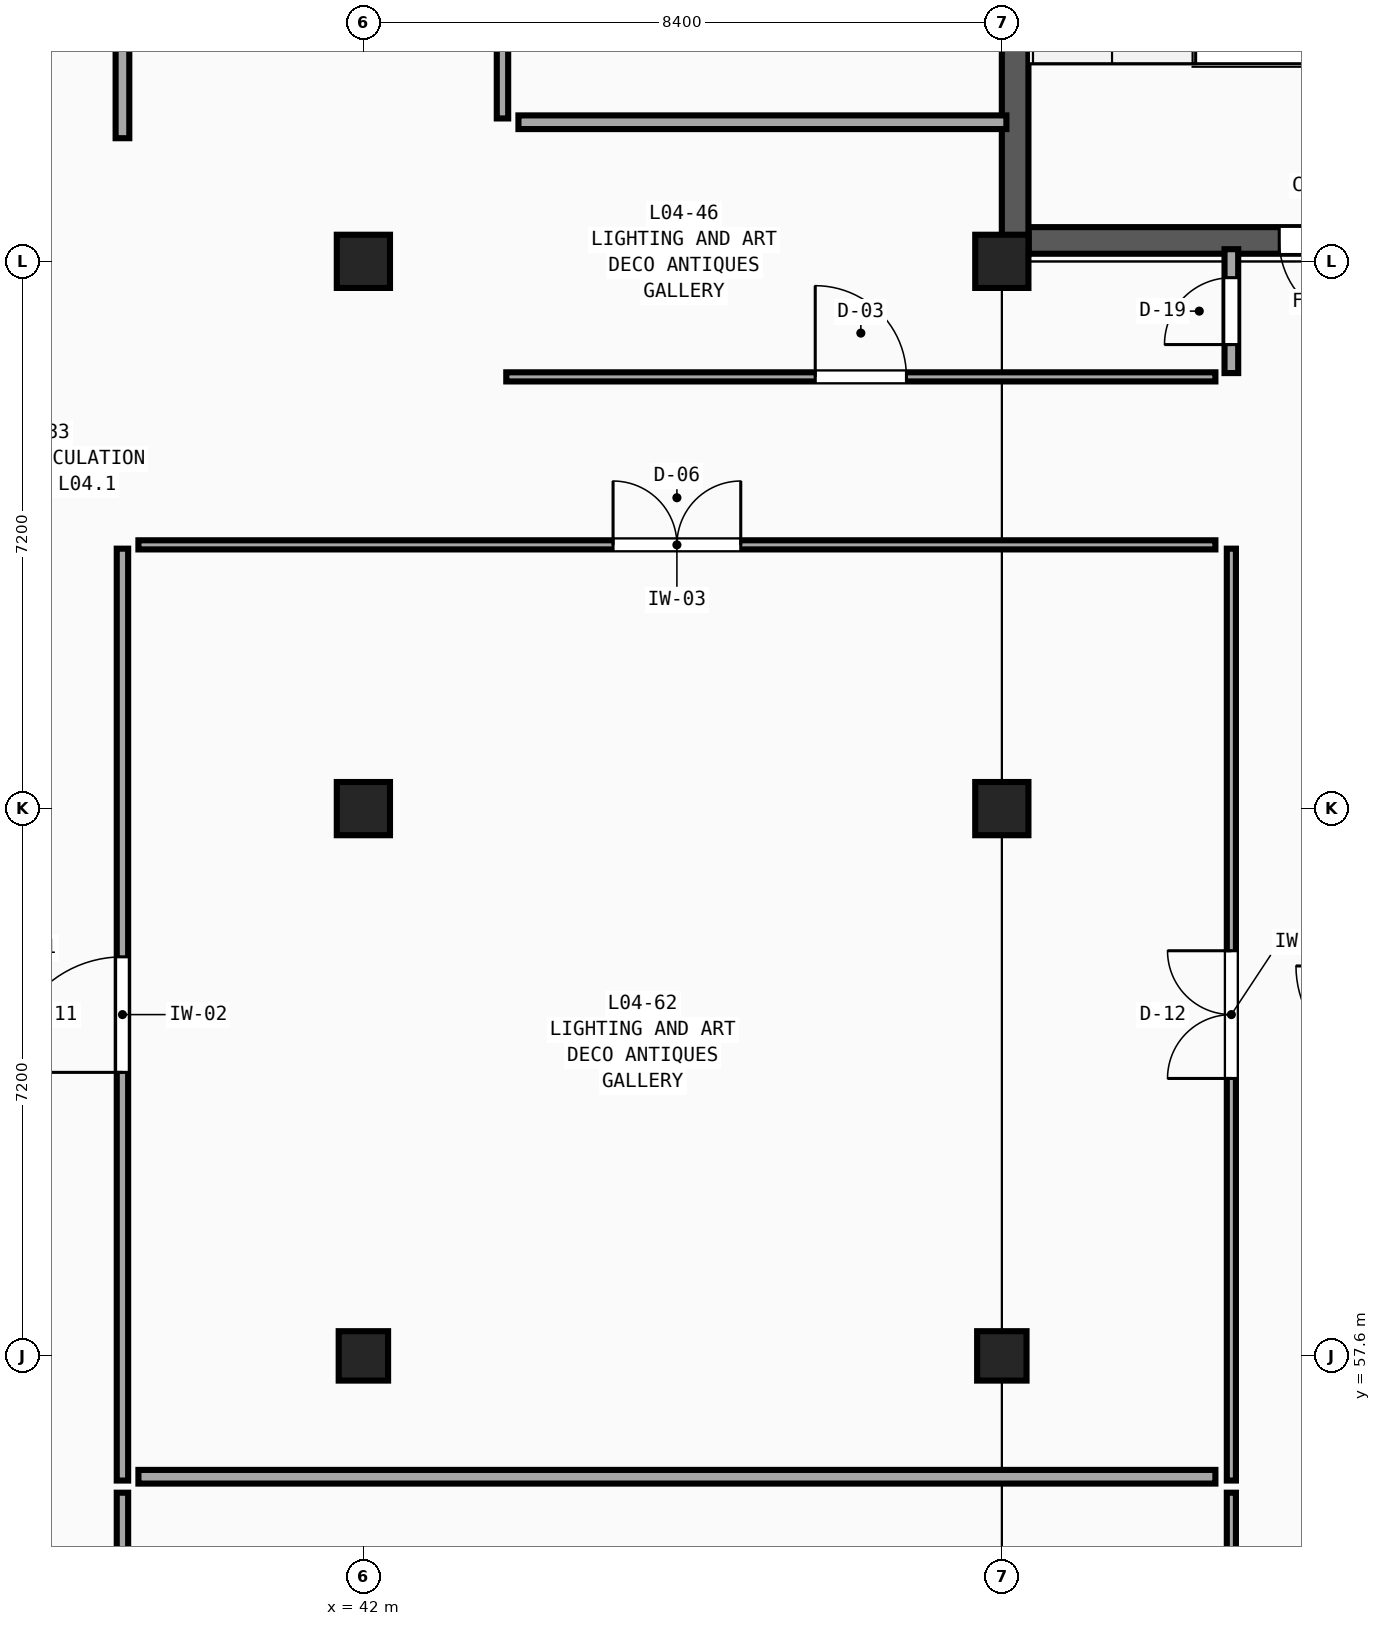
"""IFC4 building model, lengths in metres.
Left out: names, types, materials, properties, quantities, classifications, styles, units other than length and angle.
Written with IfcOpenShell. Run it as: python <this file> out.ifc"""

import sys

from ifc_helpers import new_model, si_unit, direction, frame, frame_2d, origin, origin_2d, place, context, subcontext, project, spatial, rectangle, extrude, element, fill, save


model = new_model("IFC4")
c1 = context("Model", 3, precision=1e-05, world=origin(), true_north=direction((0.0, 1.0)))
c2 = subcontext(c1, "Body", "Model", "MODEL_VIEW")
j1 = project(units=[si_unit("LENGTHUNIT", "METRE"), si_unit("PLANEANGLEUNIT", "RADIAN")], contexts=[c1])
p1 = place(None, origin())
s1 = spatial("IfcSite", under=j1, at=p1, CompositionType="ELEMENT")
p2 = place(p1, origin())
s2 = spatial("IfcBuilding", under=s1, at=p2, CompositionType="ELEMENT")
p3 = place(p2, frame((0.0, 0.0, 18.9)))
s3 = spatial("IfcBuildingStorey", under=s2, at=p3, CompositionType="ELEMENT", Elevation=18.9)
p4 = place(p3, frame((42.0, 57.6, 0.0), z_axis=(0.0, 0.0, 1.0), x_axis=(1.0, 0.0, 0.0)))
e1 = element("IfcColumn", 1, at=p4, inside=s3, PredefinedType="COLUMN", context=c2, shape_type="SweptSolid", body=[
    extrude(rectangle(XDim=0.65, YDim=0.65, at=origin_2d()), origin(), (0.0, 0.0, 1.0), 4.5),
])
for number, where, z_axis, x_axis in (
    (2, (42.0, 64.8, 0.0), (0.0, 0.0, 1.0), (1.0, 0.0, 0.0)),
    (3, (42.0, 72.0, 0.0), (0.0, 0.0, 1.0), (1.0, 0.0, 0.0)),
):
    element("IfcColumn", number, at=place(p3, frame(where, z_axis=z_axis, x_axis=x_axis)), inside=s3, PredefinedType="COLUMN", context=c2, shape_type="SweptSolid", body=[
        extrude(rectangle(XDim=0.7, YDim=0.7, at=origin_2d()), origin(), (0.0, 0.0, 1.0), 4.5),
    ])
p5 = place(p3, frame((50.4, 57.6, 0.0), z_axis=(0.0, 0.0, 1.0), x_axis=(1.0, 0.0, 0.0)))
e4 = element("IfcColumn", 4, at=p5, inside=s3, PredefinedType="COLUMN", context=c2, shape_type="SweptSolid", body=[
    extrude(rectangle(XDim=0.65, YDim=0.65, at=origin_2d()), origin(), (0.0, 0.0, 1.0), 4.5),
])
for number, where, z_axis, x_axis in (
    (5, (50.4, 64.8, 0.0), (0.0, 0.0, 1.0), (1.0, 0.0, 0.0)),
    (6, (50.4, 72.0, 0.0), (0.0, 0.0, 1.0), (1.0, 0.0, 0.0)),
):
    element("IfcColumn", number, at=place(p3, frame(where, z_axis=z_axis, x_axis=x_axis)), inside=s3, PredefinedType="COLUMN", context=c2, shape_type="SweptSolid", body=[
        extrude(rectangle(XDim=0.7, YDim=0.7, at=origin_2d()), origin(), (0.0, 0.0, 1.0), 4.5),
    ])
p6 = place(p3, frame((58.45, 72.275, 0.0), z_axis=(0.0, 0.0, 1.0), x_axis=(-1.0, 0.0, 0.0)))
e7 = element("IfcWall", 7, at=p6, inside=s3, PredefinedType="SHEAR", context=c2, shape_type="SweptSolid", body=[
    extrude(rectangle(XDim=7.7, YDim=0.35, at=frame_2d((3.85, 0.0))), origin(), (0.0, 0.0, 1.0), 4.5),
])
p7 = place(p6, frame((3.3, 0.0, 0.0)))
e8 = element("IfcOpeningElement", 8, at=p7, cuts=e7, PredefinedType="OPENING", context=c2, shape_type="SweptSolid", body=[
    extrude(rectangle(XDim=1.1, YDim=2.2, at=frame_2d((0.55, 1.1))), frame((0.0, 0.195, 0.0), z_axis=(0.0, -1.0, 0.0), x_axis=(1.0, 0.0, 0.0)), (0.0, 0.0, 1.0), 0.39),
])
p8 = place(p3, frame((50.575, 80.45, 0.0), z_axis=(0.0, 0.0, 1.0), x_axis=(0.0, -1.0, 0.0)))
e9 = element("IfcWall", 9, at=p8, inside=s3, PredefinedType="SHEAR", context=c2, shape_type="SweptSolid", body=[
    extrude(rectangle(XDim=8.35, YDim=0.35, at=frame_2d((4.175, 0.0))), origin(), (0.0, 0.0, 1.0), 4.5),
])
p9 = place(p3, frame((53.42, 39.91, 0.0), z_axis=(0.0, 0.0, 1.0), x_axis=(0.0, 1.0, 0.0)))
e10 = element("IfcWall", 10, at=p9, inside=s3, PredefinedType="PARTITIONING", context=c2, shape_type="SweptSolid", body=[
    extrude(rectangle(XDim=15.89, YDim=0.12, at=frame_2d((7.945, 0.0))), origin(), (0.0, 0.0, 1.0), 4.18),
])
p10 = place(p9, frame((7.105, 0.0, 0.0)))
e11 = element("IfcOpeningElement", 11, at=p10, cuts=e10, PredefinedType="OPENING", context=c2, shape_type="SweptSolid", body=[
    extrude(rectangle(XDim=1.68, YDim=2.45, at=frame_2d((0.84, 1.225))), frame((0.0, 0.08, 0.0), z_axis=(0.0, -1.0, 0.0), x_axis=(1.0, 0.0, 0.0)), (0.0, 0.0, 1.0), 0.16),
])
p11 = place(p3, frame((39.04, 68.27, 0.0), z_axis=(0.0, 0.0, 1.0), x_axis=(1.0, 0.0, 0.0)))
e12 = element("IfcWall", 12, at=p11, inside=s3, PredefinedType="PARTITIONING", context=c2, shape_type="SweptSolid", body=[
    extrude(rectangle(XDim=14.17, YDim=0.12, at=frame_2d((7.085, 0.0))), origin(), (0.0, 0.0, 1.0), 4.18),
])
p12 = place(p11, frame((6.245, 0.0, 0.0)))
e13 = element("IfcOpeningElement", 13, at=p12, cuts=e12, PredefinedType="OPENING", context=c2, shape_type="SweptSolid", body=[
    extrude(rectangle(XDim=1.68, YDim=2.05, at=frame_2d((0.84, 1.025))), frame((0.0, 0.08, 0.0), z_axis=(0.0, -1.0, 0.0), x_axis=(1.0, 0.0, 0.0)), (0.0, 0.0, 1.0), 0.16),
])
p13 = place(p3, frame((38.83, 55.96, 0.0), z_axis=(0.0, 0.0, 1.0), x_axis=(0.0, 1.0, 0.0)))
e14 = element("IfcWall", 14, at=p13, inside=s3, PredefinedType="PARTITIONING", context=c2, shape_type="SweptSolid", body=[
    extrude(rectangle(XDim=12.26, YDim=0.15, at=frame_2d((6.13, 0.0))), origin(), (0.0, 0.0, 1.0), 4.18),
])
p14 = place(p13, frame((5.37, 0.0, 0.0)))
e15 = element("IfcOpeningElement", 15, at=p14, cuts=e14, PredefinedType="OPENING", context=c2, shape_type="SweptSolid", body=[
    extrude(rectangle(XDim=1.52, YDim=2.13, at=frame_2d((0.76, 1.065))), frame((0.0, 0.095, 0.0), z_axis=(0.0, -1.0, 0.0), x_axis=(1.0, 0.0, 0.0)), (0.0, 0.0, 1.0), 0.19),
])
p15 = place(p3, frame((53.42, 55.96, 0.0), z_axis=(0.0, 0.0, 1.0), x_axis=(0.0, 1.0, 0.0)))
e16 = element("IfcWall", 16, at=p15, inside=s3, PredefinedType="PARTITIONING", context=c2, shape_type="SweptSolid", body=[
    extrude(rectangle(XDim=12.26, YDim=0.12, at=frame_2d((6.13, 0.0))), origin(), (0.0, 0.0, 1.0), 4.18),
])
p16 = place(p15, frame((5.29, 0.0, 0.0)))
e17 = element("IfcOpeningElement", 17, at=p16, cuts=e16, PredefinedType="OPENING", context=c2, shape_type="SweptSolid", body=[
    extrude(rectangle(XDim=1.68, YDim=2.13, at=frame_2d((0.84, 1.065))), frame((0.0, 0.08, 0.0), z_axis=(0.0, -1.0, 0.0), x_axis=(1.0, 0.0, 0.0)), (0.0, 0.0, 1.0), 0.16),
])
p17 = place(p3, frame((38.83, 73.62, 0.0), z_axis=(0.0, 0.0, 1.0), x_axis=(0.0, 1.0, 0.0)))
e18 = element("IfcWall", 18, at=p17, inside=s3, PredefinedType="PARTITIONING", context=c2, shape_type="SweptSolid", body=[
    extrude(rectangle(XDim=11.05, YDim=0.18, at=frame_2d((5.525, 0.0))), origin(), (0.0, 0.0, 1.0), 4.18),
])
p18 = place(p17, frame((4.845, 0.0, 0.0)))
e19 = element("IfcOpeningElement", 19, at=p18, cuts=e18, PredefinedType="OPENING", context=c2, shape_type="SweptSolid", body=[
    extrude(rectangle(XDim=1.36, YDim=2.29, at=frame_2d((0.68, 1.145))), frame((0.0, 0.11, 0.0), z_axis=(0.0, -1.0, 0.0), x_axis=(1.0, 0.0, 0.0)), (0.0, 0.0, 1.0), 0.22),
])
p19 = place(p3, frame((38.83, 45.99, 0.0), z_axis=(0.0, 0.0, 1.0), x_axis=(0.0, 1.0, 0.0)))
e20 = element("IfcWall", 20, at=p19, inside=s3, PredefinedType="PARTITIONING", context=c2, shape_type="SweptSolid", body=[
    extrude(rectangle(XDim=9.81, YDim=0.15, at=frame_2d((4.905, 0.0))), origin(), (0.0, 0.0, 1.0), 4.18),
])
p20 = place(p19, frame((4.385, 0.0, 0.0)))
e21 = element("IfcOpeningElement", 21, at=p20, cuts=e20, PredefinedType="OPENING", context=c2, shape_type="SweptSolid", body=[
    extrude(rectangle(XDim=1.04, YDim=2.45, at=frame_2d((0.52, 1.225))), frame((0.0, 0.095, 0.0), z_axis=(0.0, -1.0, 0.0), x_axis=(1.0, 0.0, 0.0)), (0.0, 0.0, 1.0), 0.19),
])
p21 = place(p3, frame((43.88, 70.48, 0.0), z_axis=(0.0, 0.0, 1.0), x_axis=(1.0, 0.0, 0.0)))
e22 = element("IfcWall", 22, at=p21, inside=s3, PredefinedType="PARTITIONING", context=c2, shape_type="SweptSolid", body=[
    extrude(rectangle(XDim=9.33, YDim=0.12, at=frame_2d((4.665, 0.0))), origin(), (0.0, 0.0, 1.0), 4.18),
])
p22 = place(p21, frame((4.065, 0.0, 0.0)))
e23 = element("IfcOpeningElement", 23, at=p22, cuts=e22, PredefinedType="OPENING", context=c2, shape_type="SweptSolid", body=[
    extrude(rectangle(XDim=1.2, YDim=2.05, at=frame_2d((0.6, 1.025))), frame((0.0, 0.08, 0.0), z_axis=(0.0, -1.0, 0.0), x_axis=(1.0, 0.0, 0.0)), (0.0, 0.0, 1.0), 0.16),
])
p23 = place(p3, frame((53.42, 70.53, 0.0), z_axis=(0.0, 0.0, 1.0), x_axis=(0.0, 1.0, 0.0)))
e24 = element("IfcWall", 24, at=p23, inside=s3, PredefinedType="PARTITIONING", context=c2, shape_type="SweptSolid", body=[
    extrude(rectangle(XDim=1.63, YDim=0.18, at=frame_2d((0.815, 0.0))), origin(), (0.0, 0.0, 1.0), 4.18),
])
p24 = place(p23, frame((0.375, 0.0, 0.0)))
e25 = element("IfcOpeningElement", 25, at=p24, cuts=e24, PredefinedType="OPENING", context=c2, shape_type="SweptSolid", body=[
    extrude(rectangle(XDim=0.88, YDim=2.29, at=frame_2d((0.44, 1.145))), frame((0.0, 0.11, 0.0), z_axis=(0.0, -1.0, 0.0), x_axis=(1.0, 0.0, 0.0)), (0.0, 0.0, 1.0), 0.22),
])
p25 = place(p3, frame((39.04, 56.01, 0.0), z_axis=(0.0, 0.0, 1.0), x_axis=(1.0, 0.0, 0.0)))
e26 = element("IfcWall", 26, at=p25, inside=s3, PredefinedType="PARTITIONING", context=c2, shape_type="SweptSolid", body=[
    extrude(rectangle(XDim=14.17, YDim=0.18, at=frame_2d((7.085, 0.0))), origin(), (0.0, 0.0, 1.0), 4.18),
])
p26 = place(p3, frame((43.83, 73.88, 0.0), z_axis=(0.0, 0.0, 1.0), x_axis=(0.0, 1.0, 0.0)))
e27 = element("IfcWall", 27, at=p26, inside=s3, PredefinedType="PARTITIONING", context=c2, shape_type="SweptSolid", body=[
    extrude(rectangle(XDim=10.817, YDim=0.15, at=frame_2d((5.409, 0.0))), origin(), (0.0, 0.0, 1.0), 4.18),
])
p27 = place(p3, frame((44.04, 73.83, 0.0), z_axis=(0.0, 0.0, 1.0), x_axis=(1.0, 0.0, 0.0)))
e28 = element("IfcWall", 28, at=p27, inside=s3, PredefinedType="PARTITIONING", context=c2, shape_type="SweptSolid", body=[
    extrude(rectangle(XDim=6.42, YDim=0.18, at=frame_2d((3.21, 0.0))), origin(), (0.0, 0.0, 1.0), 4.18),
])
p28 = place(p7, origin())
e29 = element("IfcDoor", 29, at=p28, inside=s3, OperationType="SINGLE_SWING_LEFT", PredefinedType="DOOR", context=c2, shape_type="SweptSolid", body=[
    extrude(rectangle(XDim=1.1, YDim=2.2, at=frame_2d((0.55, 1.1))), frame((0.0, 0.025, 0.0), z_axis=(0.0, -1.0, 0.0), x_axis=(1.0, 0.0, 0.0)), (0.0, 0.0, 1.0), 0.05),
])
fill(e8, e29)
p29 = place(p12, origin())
e30 = element("IfcDoor", 30, at=p29, inside=s3, OperationType="DOUBLE_DOOR_SINGLE_SWING", PredefinedType="DOOR", context=c2, shape_type="SweptSolid", body=[
    extrude(rectangle(XDim=1.68, YDim=2.05, at=frame_2d((0.84, 1.025))), frame((0.0, 0.025, 0.0), z_axis=(0.0, -1.0, 0.0), x_axis=(1.0, 0.0, 0.0)), (0.0, 0.0, 1.0), 0.05),
])
fill(e13, e30)
p30 = place(p14, origin())
e31 = element("IfcDoor", 31, at=p30, inside=s3, OperationType="SINGLE_SWING_LEFT", PredefinedType="DOOR", context=c2, shape_type="SweptSolid", body=[
    extrude(rectangle(XDim=1.52, YDim=2.13, at=frame_2d((0.76, 1.065))), frame((0.0, 0.025, 0.0), z_axis=(0.0, -1.0, 0.0), x_axis=(1.0, 0.0, 0.0)), (0.0, 0.0, 1.0), 0.05),
])
fill(e15, e31)
p31 = place(p16, origin())
e32 = element("IfcDoor", 32, at=p31, inside=s3, OperationType="DOUBLE_DOOR_SINGLE_SWING", PredefinedType="DOOR", context=c2, shape_type="SweptSolid", body=[
    extrude(rectangle(XDim=1.68, YDim=2.13, at=frame_2d((0.84, 1.065))), frame((0.0, 0.025, 0.0), z_axis=(0.0, -1.0, 0.0), x_axis=(1.0, 0.0, 0.0)), (0.0, 0.0, 1.0), 0.05),
])
fill(e17, e32)
p32 = place(p22, origin())
e33 = element("IfcDoor", 33, at=p32, inside=s3, OperationType="SINGLE_SWING_LEFT", PredefinedType="DOOR", context=c2, shape_type="SweptSolid", body=[
    extrude(rectangle(XDim=1.2, YDim=2.05, at=frame_2d((0.6, 1.025))), frame((0.0, 0.025, 0.0), z_axis=(0.0, -1.0, 0.0), x_axis=(1.0, 0.0, 0.0)), (0.0, 0.0, 1.0), 0.05),
])
fill(e23, e33)
p33 = place(p24, origin())
e34 = element("IfcDoor", 34, at=p33, inside=s3, OperationType="SINGLE_SWING_LEFT", PredefinedType="DOOR", context=c2, shape_type="SweptSolid", body=[
    extrude(rectangle(XDim=0.88, YDim=2.29, at=frame_2d((0.44, 1.145))), frame((0.0, 0.025, 0.0), z_axis=(0.0, -1.0, 0.0), x_axis=(1.0, 0.0, 0.0)), (0.0, 0.0, 1.0), 0.05),
])
fill(e25, e34)
save(model, sys.argv[1])
